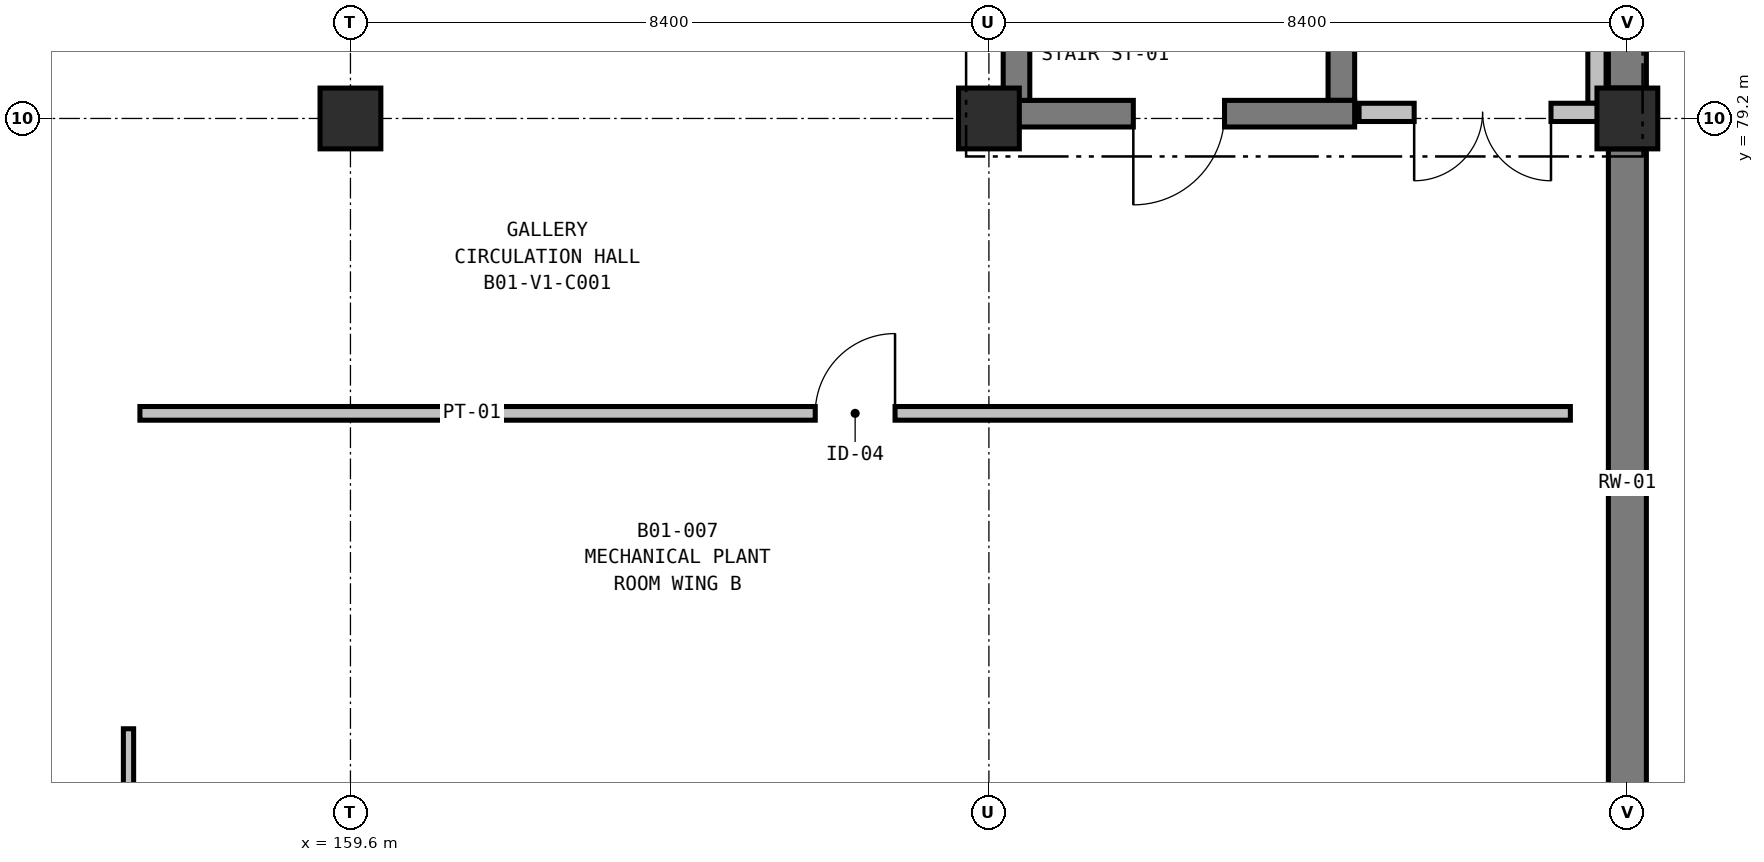
"""IFC4 building model, lengths in metres.
Left out: names, types, materials, properties, quantities, classifications, styles, units other than length and angle.
Written with IfcOpenShell. Run it as: python <this file> out.ifc"""

import sys

from ifc_helpers import new_model, si_unit, direction, frame, frame_2d, origin, origin_2d, place, context, subcontext, project, spatial, rectangle, extrude, element, fill, save


model = new_model("IFC4")
c1 = context("Model", 3, precision=1e-05, world=origin(), true_north=direction((0.0, 1.0)))
c2 = subcontext(c1, "Body", "Model", "MODEL_VIEW")
j1 = project(units=[si_unit("LENGTHUNIT", "METRE"), si_unit("PLANEANGLEUNIT", "RADIAN")], contexts=[c1])
p1 = place(None, origin())
s1 = spatial("IfcSite", under=j1, at=p1, CompositionType="ELEMENT")
p2 = place(p1, origin())
s2 = spatial("IfcBuilding", under=s1, at=p2, CompositionType="ELEMENT")
p3 = place(p2, frame((0.0, 0.0, -5.4)))
s3 = spatial("IfcBuildingStorey", under=s2, at=p3, CompositionType="ELEMENT", Elevation=-5.4)
for number, where, z_axis, x_axis in (
    (1, (159.6, 79.2, 0.0), (0.0, 0.0, 1.0), (1.0, 0.0, 0.0)),
    (2, (168.0, 79.2, 0.0), (0.0, 0.0, 1.0), (1.0, 0.0, 0.0)),
    (3, (176.4, 79.2, 0.0), (0.0, 0.0, 1.0), (1.0, 0.0, 0.0)),
):
    element("IfcColumn", number, at=place(p3, frame(where, z_axis=z_axis, x_axis=x_axis)), inside=s3, PredefinedType="COLUMN", context=c2, shape_type="SweptSolid", body=[
        extrude(rectangle(XDim=0.8, YDim=0.8, at=origin_2d()), origin(), (0.0, 0.0, 1.0), 5.4),
    ])
p4 = place(p3, frame((176.4, 88.4, 0.0), z_axis=(0.0, 0.0, 1.0), x_axis=(0.0, -1.0, 0.0)))
e4 = element("IfcWall", 4, at=p4, inside=s3, PredefinedType="USERDEFINED", context=c2, shape_type="SweptSolid", body=[
    extrude(rectangle(XDim=8.8, YDim=0.5, at=frame_2d((4.4, 0.0))), origin(), (0.0, 0.0, 1.0), 5.06),
])
p5 = place(p3, frame((176.4, 78.8, 0.0), z_axis=(0.0, 0.0, 1.0), x_axis=(0.0, -1.0, 0.0)))
e5 = element("IfcWall", 5, at=p5, inside=s3, PredefinedType="USERDEFINED", context=c2, shape_type="SweptSolid", body=[
    extrude(rectangle(XDim=8.8, YDim=0.5, at=frame_2d((4.4, 0.0))), origin(), (0.0, 0.0, 1.0), 5.06),
])
p6 = place(p3, frame((172.637, 88.562, 0.0), z_axis=(0.0, 0.0, 1.0), x_axis=(0.0, -1.0, 0.0)))
e6 = element("IfcWall", 6, at=p6, inside=s3, PredefinedType="SHEAR", context=c2, shape_type="SweptSolid", body=[
    extrude(rectangle(XDim=9.124, YDim=0.35, at=frame_2d((4.562, 0.0))), origin(), (0.0, 0.0, 1.0), 5.06),
])
p7 = place(p3, frame((172.812, 79.263, 0.0), z_axis=(0.0, 0.0, 1.0), x_axis=(-1.0, 0.0, 0.0)))
e7 = element("IfcWall", 7, at=p7, inside=s3, PredefinedType="SHEAR", context=c2, shape_type="SweptSolid", body=[
    extrude(rectangle(XDim=4.624, YDim=0.35, at=frame_2d((2.312, 0.0))), origin(), (0.0, 0.0, 1.0), 5.06),
])
p8 = place(p7, frame((1.712, 0.0, 0.0)))
e8 = element("IfcOpeningElement", 8, at=p8, cuts=e7, PredefinedType="OPENING", context=c2, shape_type="SweptSolid", body=[
    extrude(rectangle(XDim=1.2, YDim=2.2, at=frame_2d((0.6, 1.1))), frame((0.0, 0.185, 0.0), z_axis=(0.0, -1.0, 0.0), x_axis=(1.0, 0.0, 0.0)), (0.0, 0.0, 1.0), 0.37),
])
p9 = place(p3, frame((168.363, 79.438, 0.0), z_axis=(0.0, 0.0, 1.0), x_axis=(0.0, 1.0, 0.0)))
e9 = element("IfcWall", 9, at=p9, inside=s3, PredefinedType="SHEAR", context=c2, shape_type="SweptSolid", body=[
    extrude(rectangle(XDim=9.124, YDim=0.35, at=frame_2d((4.562, 0.0))), origin(), (0.0, 0.0, 1.0), 5.06),
])
p10 = place(p3, frame((176.0, 84.9, 0.0), z_axis=(0.0, 0.0, 1.0), x_axis=(0.0, -1.0, 0.0)))
e10 = element("IfcWall", 10, at=p10, inside=s3, PredefinedType="PARTITIONING", context=c2, shape_type="SweptSolid", body=[
    extrude(rectangle(XDim=5.5, YDim=0.24, at=frame_2d((2.75, 0.0))), origin(), (0.0, 0.0, 1.0), 4.385),
])
p11 = place(p3, frame((176.12, 79.28, 0.0), z_axis=(0.0, 0.0, 1.0), x_axis=(-1.0, 0.0, 0.0)))
e11 = element("IfcWall", 11, at=p11, inside=s3, PredefinedType="PARTITIONING", context=c2, shape_type="SweptSolid", body=[
    extrude(rectangle(XDim=3.25, YDim=0.24, at=frame_2d((1.625, 0.0))), origin(), (0.0, 0.0, 1.0), 4.385),
])
p12 = place(p11, frame((0.725, 0.0, 0.0)))
e12 = element("IfcOpeningElement", 12, at=p12, cuts=e11, PredefinedType="OPENING", context=c2, shape_type="SweptSolid", body=[
    extrude(rectangle(XDim=1.8, YDim=2.25, at=frame_2d((0.9, 1.125))), frame((0.0, 0.13, 0.0), z_axis=(0.0, -1.0, 0.0), x_axis=(1.0, 0.0, 0.0)), (0.0, 0.0, 1.0), 0.26),
])
p13 = place(p3, frame((156.68, 60.27, 0.0), z_axis=(0.0, 0.0, 1.0), x_axis=(0.0, 1.0, 0.0)))
e13 = element("IfcWall", 13, at=p13, inside=s3, PredefinedType="PARTITIONING", context=c2, shape_type="SweptSolid", body=[
    extrude(rectangle(XDim=10.9, YDim=0.135, at=frame_2d((5.45, 0.0))), origin(), (0.0, 0.0, 1.0), 4.185),
])
p14 = place(p13, frame((4.65, 0.0, 0.0)))
e14 = element("IfcOpeningElement", 14, at=p14, cuts=e13, PredefinedType="OPENING", context=c2, shape_type="SweptSolid", body=[
    extrude(rectangle(XDim=1.6, YDim=2.35, at=frame_2d((0.8, 1.175))), frame((0.0, 0.077, 0.0), z_axis=(0.0, -1.0, 0.0), x_axis=(1.0, 0.0, 0.0)), (0.0, 0.0, 1.0), 0.155),
])
p15 = place(p3, frame((156.83, 75.32, 0.0), z_axis=(0.0, 0.0, 1.0), x_axis=(1.0, 0.0, 0.0)))
e15 = element("IfcWall", 15, at=p15, inside=s3, PredefinedType="PARTITIONING", context=c2, shape_type="SweptSolid", body=[
    extrude(rectangle(XDim=18.82, YDim=0.18, at=frame_2d((9.41, 0.0))), origin(), (0.0, 0.0, 1.0), 4.235),
])
p16 = place(p15, frame((8.885, 0.0, 0.0)))
e16 = element("IfcOpeningElement", 16, at=p16, cuts=e15, PredefinedType="OPENING", context=c2, shape_type="SweptSolid", body=[
    extrude(rectangle(XDim=1.05, YDim=2.2, at=frame_2d((0.525, 1.1))), frame((0.0, 0.1, 0.0), z_axis=(0.0, -1.0, 0.0), x_axis=(1.0, 0.0, 0.0)), (0.0, 0.0, 1.0), 0.2),
])
p17 = place(p8, origin())
e17 = element("IfcDoor", 17, at=p17, inside=s3, OperationType="SINGLE_SWING_RIGHT", PredefinedType="DOOR", context=c2, shape_type="SweptSolid", body=[
    extrude(rectangle(XDim=1.2, YDim=2.2, at=frame_2d((0.6, 1.1))), frame((0.0, 0.025, 0.0), z_axis=(0.0, -1.0, 0.0), x_axis=(1.0, 0.0, 0.0)), (0.0, 0.0, 1.0), 0.05),
])
fill(e8, e17)
p18 = place(p12, origin())
e18 = element("IfcDoor", 18, at=p18, inside=s3, OperationType="DOUBLE_DOOR_SINGLE_SWING", PredefinedType="DOOR", context=c2, shape_type="SweptSolid", body=[
    extrude(rectangle(XDim=1.8, YDim=2.25, at=frame_2d((0.9, 1.125))), frame((0.0, 0.025, 0.0), z_axis=(0.0, -1.0, 0.0), x_axis=(1.0, 0.0, 0.0)), (0.0, 0.0, 1.0), 0.05),
])
fill(e12, e18)
p19 = place(p16, origin())
e19 = element("IfcDoor", 19, at=p19, inside=s3, OperationType="SINGLE_SWING_RIGHT", PredefinedType="DOOR", context=c2, shape_type="SweptSolid", body=[
    extrude(rectangle(XDim=1.05, YDim=2.2, at=frame_2d((0.525, 1.1))), frame((0.0, 0.025, 0.0), z_axis=(0.0, -1.0, 0.0), x_axis=(1.0, 0.0, 0.0)), (0.0, 0.0, 1.0), 0.05),
])
fill(e16, e19)
save(model, sys.argv[1])
